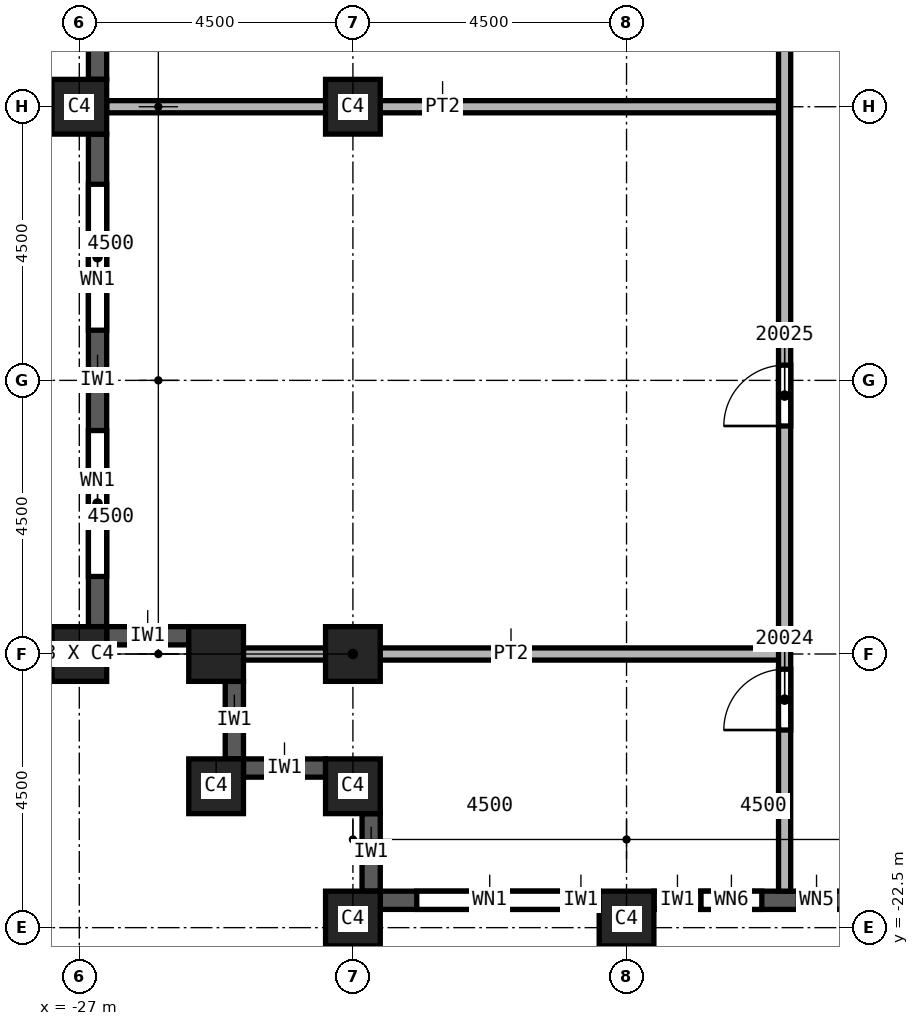
"""IFC4 building model, lengths in metres.
Left out: names, types, materials, properties, quantities, classifications, styles, units other than length and angle.
Written with IfcOpenShell. Run it as: python <this file> out.ifc"""

import sys

from ifc_helpers import new_model, si_unit, direction, frame, frame_2d, origin, origin_2d, place, context, subcontext, project, spatial, rectangle, extrude, element, fill, save


model = new_model("IFC4")
c1 = context("Model", 3, precision=1e-05, world=origin(), true_north=direction((0.0, 1.0)))
c2 = subcontext(c1, "Body", "Model", "MODEL_VIEW")
j1 = project(units=[si_unit("LENGTHUNIT", "METRE"), si_unit("PLANEANGLEUNIT", "RADIAN")], contexts=[c1])
p1 = place(None, origin())
s1 = spatial("IfcSite", under=j1, at=p1, CompositionType="ELEMENT")
p2 = place(p1, origin())
s2 = spatial("IfcBuilding", under=s1, at=p2, CompositionType="ELEMENT")
p3 = place(p2, frame((0.0, 0.0, 286.0)))
s3 = spatial("IfcBuildingStorey", under=s2, at=p3, CompositionType="ELEMENT", Elevation=286.0)
for number, where, z_axis, x_axis in (
    (1, (-22.5, -9.0, 0.0), (0.0, 0.0, 1.0), (1.0, 0.0, 0.0)),
    (2, (-22.5, -18.0, 0.0), (0.0, 0.0, 1.0), (1.0, 0.0, 0.0)),
    (3, (-18.0, -22.35, 0.0), (0.0, 0.0, 1.0), (1.0, 0.0, 0.0)),
    (4, (-22.5, -22.35, 0.0), (0.0, 0.0, 1.0), (1.0, 0.0, 0.0)),
    (5, (-27.0, -9.0, 0.0), (0.0, 0.0, 1.0), (0.0, 1.0, 0.0)),
    (6, (-27.0, -18.0, 0.0), (0.0, 0.0, 1.0), (0.0, 1.0, 0.0)),
    (7, (-22.5, -20.175, 0.0), (0.0, 0.0, 1.0), (1.0, 0.0, 0.0)),
    (8, (-24.75, -20.175, 0.0), (0.0, 0.0, 1.0), (1.0, 0.0, 0.0)),
    (9, (-24.75, -18.0, 0.0), (0.0, 0.0, 1.0), (1.0, 0.0, 0.0)),
):
    element("IfcColumn", number, at=place(p3, frame(where, z_axis=z_axis, x_axis=x_axis)), inside=s3, PredefinedType="COLUMN", context=c2, shape_type="SweptSolid", body=[
        extrude(rectangle(XDim=0.9, YDim=0.9, at=origin_2d()), origin(), (0.0, 0.0, 1.0), 3.72),
    ])
p4 = place(p3, frame((-26.7, -0.45, 0.0), z_axis=(0.0, 0.0, 1.0), x_axis=(0.0, -1.0, 0.0)))
e10 = element("IfcWall", 10, at=p4, inside=s3, PredefinedType="SOLIDWALL", context=c2, shape_type="SweptSolid", body=[
    extrude(rectangle(XDim=8.1, YDim=0.3, at=frame_2d((4.05, 0.0))), origin(), (0.0, 0.0, 1.0), 3.12),
])
p5 = place(p4, frame((0.825, 0.0, 0.8)))
e11 = element("IfcOpeningElement", 11, at=p5, cuts=e10, PredefinedType="OPENING", context=c2, shape_type="SweptSolid", body=[
    extrude(rectangle(XDim=2.4, YDim=1.95, at=frame_2d((1.2, 0.975))), frame((0.0, 0.15, 0.0), z_axis=(0.0, -1.0, 0.0), x_axis=(1.0, 0.0, 0.0)), (0.0, 0.0, 1.0), 0.3),
])
p6 = place(p4, frame((4.875, 0.0, 0.8)))
e12 = element("IfcOpeningElement", 12, at=p6, cuts=e10, PredefinedType="OPENING", context=c2, shape_type="SweptSolid", body=[
    extrude(rectangle(XDim=2.4, YDim=1.95, at=frame_2d((1.2, 0.975))), frame((0.0, 0.15, 0.0), z_axis=(0.0, -1.0, 0.0), x_axis=(1.0, 0.0, 0.0)), (0.0, 0.0, 1.0), 0.3),
])
p7 = place(p3, frame((-26.7, -9.45, 0.0), z_axis=(0.0, 0.0, 1.0), x_axis=(0.0, -1.0, 0.0)))
e13 = element("IfcWall", 13, at=p7, inside=s3, PredefinedType="SOLIDWALL", context=c2, shape_type="SweptSolid", body=[
    extrude(rectangle(XDim=8.1, YDim=0.3, at=frame_2d((4.05, 0.0))), origin(), (0.0, 0.0, 1.0), 3.12),
])
p8 = place(p7, frame((0.825, 0.0, 0.8)))
e14 = element("IfcOpeningElement", 14, at=p8, cuts=e13, PredefinedType="OPENING", context=c2, shape_type="SweptSolid", body=[
    extrude(rectangle(XDim=2.4, YDim=1.95, at=frame_2d((1.2, 0.975))), frame((0.0, 0.15, 0.0), z_axis=(0.0, -1.0, 0.0), x_axis=(1.0, 0.0, 0.0)), (0.0, 0.0, 1.0), 0.3),
])
p9 = place(p7, frame((4.875, 0.0, 0.8)))
e15 = element("IfcOpeningElement", 15, at=p9, cuts=e13, PredefinedType="OPENING", context=c2, shape_type="SweptSolid", body=[
    extrude(rectangle(XDim=2.4, YDim=1.95, at=frame_2d((1.2, 0.975))), frame((0.0, 0.15, 0.0), z_axis=(0.0, -1.0, 0.0), x_axis=(1.0, 0.0, 0.0)), (0.0, 0.0, 1.0), 0.3),
])
p10 = place(p3, frame((-26.55, -17.7, 0.0), z_axis=(0.0, 0.0, 1.0), x_axis=(1.0, 0.0, 0.0)))
e16 = element("IfcWall", 16, at=p10, inside=s3, PredefinedType="SOLIDWALL", context=c2, shape_type="SweptSolid", body=[
    extrude(rectangle(XDim=1.35, YDim=0.3, at=frame_2d((0.675, 0.0))), origin(), (0.0, 0.0, 1.0), 3.12),
])
p11 = place(p3, frame((-24.45, -18.45, 0.0), z_axis=(0.0, 0.0, 1.0), x_axis=(0.0, -1.0, 0.0)))
e17 = element("IfcWall", 17, at=p11, inside=s3, PredefinedType="SOLIDWALL", context=c2, shape_type="SweptSolid", body=[
    extrude(rectangle(XDim=1.275, YDim=0.3, at=frame_2d((0.638, 0.0))), origin(), (0.0, 0.0, 1.0), 3.12),
])
p12 = place(p3, frame((-24.3, -19.875, 0.0), z_axis=(0.0, 0.0, 1.0), x_axis=(1.0, 0.0, 0.0)))
e18 = element("IfcWall", 18, at=p12, inside=s3, PredefinedType="SOLIDWALL", context=c2, shape_type="SweptSolid", body=[
    extrude(rectangle(XDim=1.35, YDim=0.3, at=frame_2d((0.675, 0.0))), origin(), (0.0, 0.0, 1.0), 3.12),
])
p13 = place(p3, frame((-22.2, -20.625, 0.0), z_axis=(0.0, 0.0, 1.0), x_axis=(0.0, -1.0, 0.0)))
e19 = element("IfcWall", 19, at=p13, inside=s3, PredefinedType="SOLIDWALL", context=c2, shape_type="SweptSolid", body=[
    extrude(rectangle(XDim=1.275, YDim=0.3, at=frame_2d((0.637, 0.0))), origin(), (0.0, 0.0, 1.0), 3.12),
])
p14 = place(p3, frame((-22.05, -22.05, 0.0), z_axis=(0.0, 0.0, 1.0), x_axis=(1.0, 0.0, 0.0)))
e20 = element("IfcWall", 20, at=p14, inside=s3, PredefinedType="SOLIDWALL", context=c2, shape_type="SweptSolid", body=[
    extrude(rectangle(XDim=3.6, YDim=0.3, at=frame_2d((1.8, 0.0))), origin(), (0.0, 0.0, 1.0), 3.12),
])
p15 = place(p14, frame((0.6, 0.0, 0.8)))
e21 = element("IfcOpeningElement", 21, at=p15, cuts=e20, PredefinedType="OPENING", context=c2, shape_type="SweptSolid", body=[
    extrude(rectangle(XDim=2.4, YDim=1.95, at=frame_2d((1.2, 0.975))), frame((0.0, 0.15, 0.0), z_axis=(0.0, -1.0, 0.0), x_axis=(1.0, 0.0, 0.0)), (0.0, 0.0, 1.0), 0.3),
])
p16 = place(p3, frame((-17.55, -22.05, 0.0), z_axis=(0.0, 0.0, 1.0), x_axis=(1.0, 0.0, 0.0)))
e22 = element("IfcWall", 22, at=p16, inside=s3, PredefinedType="SOLIDWALL", context=c2, shape_type="SweptSolid", body=[
    extrude(rectangle(XDim=3.6, YDim=0.3, at=frame_2d((1.8, 0.0))), origin(), (0.0, 0.0, 1.0), 3.12),
])
p17 = place(p16, frame((0.775, 0.0, 0.8)))
e23 = element("IfcOpeningElement", 23, at=p17, cuts=e22, PredefinedType="OPENING", context=c2, shape_type="SweptSolid", body=[
    extrude(rectangle(XDim=1.0, YDim=1.95, at=frame_2d((0.5, 0.975))), frame((0.0, 0.15, 0.0), z_axis=(0.0, -1.0, 0.0), x_axis=(1.0, 0.0, 0.0)), (0.0, 0.0, 1.0), 0.3),
])
p18 = place(p16, frame((2.375, 0.0, 0.8)))
e24 = element("IfcOpeningElement", 24, at=p18, cuts=e22, PredefinedType="OPENING", context=c2, shape_type="SweptSolid", body=[
    extrude(rectangle(XDim=0.6, YDim=1.95, at=frame_2d((0.3, 0.975))), frame((0.0, 0.15, 0.0), z_axis=(0.0, -1.0, 0.0), x_axis=(1.0, 0.0, 0.0)), (0.0, 0.0, 1.0), 0.3),
])
p19 = place(p3, frame((-26.55, -9.0, 0.0), z_axis=(0.0, 0.0, 1.0), x_axis=(1.0, 0.0, 0.0)))
e25 = element("IfcWall", 25, at=p19, inside=s3, PredefinedType="PARTITIONING", context=c2, shape_type="SweptSolid", body=[
    extrude(rectangle(XDim=11.15, YDim=0.2, at=frame_2d((5.575, 0.0))), origin(), (0.0, 0.0, 1.0), 3.72),
])
p20 = place(p3, frame((-24.3, -18.0, 0.0), z_axis=(0.0, 0.0, 1.0), x_axis=(1.0, 0.0, 0.0)))
e26 = element("IfcWall", 26, at=p20, inside=s3, PredefinedType="PARTITIONING", context=c2, shape_type="SweptSolid", body=[
    extrude(rectangle(XDim=8.9, YDim=0.2, at=frame_2d((4.45, 0.0))), origin(), (0.0, 0.0, 1.0), 3.72),
])
p21 = place(p3, frame((-15.4, -21.9, 0.0), z_axis=(0.0, 0.0, 1.0), x_axis=(0.0, 1.0, 0.0)))
e27 = element("IfcWall", 27, at=p21, inside=s3, PredefinedType="PARTITIONING", context=c2, shape_type="SweptSolid", body=[
    extrude(rectangle(XDim=35.5, YDim=0.2, at=frame_2d((17.75, 0.0))), origin(), (0.0, 0.0, 1.0), 3.72),
])
p22 = place(p21, frame((30.9, 0.0, 0.0)))
e28 = element("IfcOpeningElement", 28, at=p22, cuts=e27, PredefinedType="OPENING", context=c2, shape_type="SweptSolid", body=[
    extrude(rectangle(XDim=1.0, YDim=2.1, at=frame_2d((0.5, 1.05))), frame((0.0, 0.1, 0.0), z_axis=(0.0, -1.0, 0.0), x_axis=(1.0, 0.0, 0.0)), (0.0, 0.0, 1.0), 0.2),
])
p23 = place(p21, frame((2.65, 0.0, 0.0)))
e29 = element("IfcOpeningElement", 29, at=p23, cuts=e27, PredefinedType="OPENING", context=c2, shape_type="SweptSolid", body=[
    extrude(rectangle(XDim=1.0, YDim=2.1, at=frame_2d((0.5, 1.05))), frame((0.0, 0.1, 0.0), z_axis=(0.0, -1.0, 0.0), x_axis=(1.0, 0.0, 0.0)), (0.0, 0.0, 1.0), 0.2),
])
p24 = place(p21, frame((7.65, 0.0, 0.0)))
e30 = element("IfcOpeningElement", 30, at=p24, cuts=e27, PredefinedType="OPENING", context=c2, shape_type="SweptSolid", body=[
    extrude(rectangle(XDim=1.0, YDim=2.1, at=frame_2d((0.5, 1.05))), frame((0.0, 0.1, 0.0), z_axis=(0.0, -1.0, 0.0), x_axis=(1.0, 0.0, 0.0)), (0.0, 0.0, 1.0), 0.2),
])
p25 = place(p21, frame((14.7, 0.0, 0.0)))
e31 = element("IfcOpeningElement", 31, at=p25, cuts=e27, PredefinedType="OPENING", context=c2, shape_type="SweptSolid", body=[
    extrude(rectangle(XDim=1.0, YDim=2.1, at=frame_2d((0.5, 1.05))), frame((0.0, 0.1, 0.0), z_axis=(0.0, -1.0, 0.0), x_axis=(1.0, 0.0, 0.0)), (0.0, 0.0, 1.0), 0.2),
])
p26 = place(p21, frame((18.3, 0.0, 0.0)))
e32 = element("IfcOpeningElement", 32, at=p26, cuts=e27, PredefinedType="OPENING", context=c2, shape_type="SweptSolid", body=[
    extrude(rectangle(XDim=1.0, YDim=2.1, at=frame_2d((0.5, 1.05))), frame((0.0, 0.1, 0.0), z_axis=(0.0, -1.0, 0.0), x_axis=(1.0, 0.0, 0.0)), (0.0, 0.0, 1.0), 0.2),
])
p27 = place(p8, origin())
e33 = element("IfcWindow", 33, at=p27, inside=s3, PartitioningType="SINGLE_PANEL", PredefinedType="WINDOW", context=c2, shape_type="SweptSolid", body=[
    extrude(rectangle(XDim=2.4, YDim=1.95, at=frame_2d((1.2, 0.975))), frame((0.0, 0.03, 0.0), z_axis=(0.0, -1.0, 0.0), x_axis=(1.0, 0.0, 0.0)), (0.0, 0.0, 1.0), 0.06),
])
fill(e14, e33)
p28 = place(p9, origin())
e34 = element("IfcWindow", 34, at=p28, inside=s3, PartitioningType="SINGLE_PANEL", PredefinedType="WINDOW", context=c2, shape_type="SweptSolid", body=[
    extrude(rectangle(XDim=2.4, YDim=1.95, at=frame_2d((1.2, 0.975))), frame((0.0, 0.03, 0.0), z_axis=(0.0, -1.0, 0.0), x_axis=(1.0, 0.0, 0.0)), (0.0, 0.0, 1.0), 0.06),
])
fill(e15, e34)
p29 = place(p15, origin())
e35 = element("IfcWindow", 35, at=p29, inside=s3, PartitioningType="SINGLE_PANEL", PredefinedType="WINDOW", context=c2, shape_type="SweptSolid", body=[
    extrude(rectangle(XDim=2.4, YDim=1.95, at=frame_2d((1.2, 0.975))), frame((0.0, 0.03, 0.0), z_axis=(0.0, -1.0, 0.0), x_axis=(1.0, 0.0, 0.0)), (0.0, 0.0, 1.0), 0.06),
])
fill(e21, e35)
p30 = place(p23, origin())
e36 = element("IfcDoor", 36, at=p30, inside=s3, OperationType="SINGLE_SWING_LEFT", PredefinedType="DOOR", context=c2, shape_type="SweptSolid", body=[
    extrude(rectangle(XDim=1.0, YDim=2.1, at=frame_2d((0.5, 1.05))), frame((0.0, 0.025, 0.0), z_axis=(0.0, -1.0, 0.0), x_axis=(1.0, 0.0, 0.0)), (0.0, 0.0, 1.0), 0.05),
])
fill(e29, e36)
p31 = place(p24, origin())
e37 = element("IfcDoor", 37, at=p31, inside=s3, OperationType="SINGLE_SWING_RIGHT", PredefinedType="DOOR", context=c2, shape_type="SweptSolid", body=[
    extrude(rectangle(XDim=1.0, YDim=2.1, at=frame_2d((0.5, 1.05))), frame((0.0, 0.025, 0.0), z_axis=(0.0, -1.0, 0.0), x_axis=(1.0, 0.0, 0.0)), (0.0, 0.0, 1.0), 0.05),
])
fill(e30, e37)
p32 = place(p17, origin())
e38 = element("IfcWindow", 38, at=p32, inside=s3, PartitioningType="SINGLE_PANEL", PredefinedType="WINDOW", context=c2, shape_type="SweptSolid", body=[
    extrude(rectangle(XDim=1.0, YDim=1.95, at=frame_2d((0.5, 0.975))), frame((0.0, 0.03, 0.0), z_axis=(0.0, -1.0, 0.0), x_axis=(1.0, 0.0, 0.0)), (0.0, 0.0, 1.0), 0.06),
])
fill(e23, e38)
p33 = place(p18, origin())
e39 = element("IfcWindow", 39, at=p33, inside=s3, PartitioningType="SINGLE_PANEL", PredefinedType="WINDOW", context=c2, shape_type="SweptSolid", body=[
    extrude(rectangle(XDim=0.6, YDim=1.95, at=frame_2d((0.3, 0.975))), frame((0.0, 0.03, 0.0), z_axis=(0.0, -1.0, 0.0), x_axis=(1.0, 0.0, 0.0)), (0.0, 0.0, 1.0), 0.06),
])
fill(e24, e39)
save(model, sys.argv[1])
